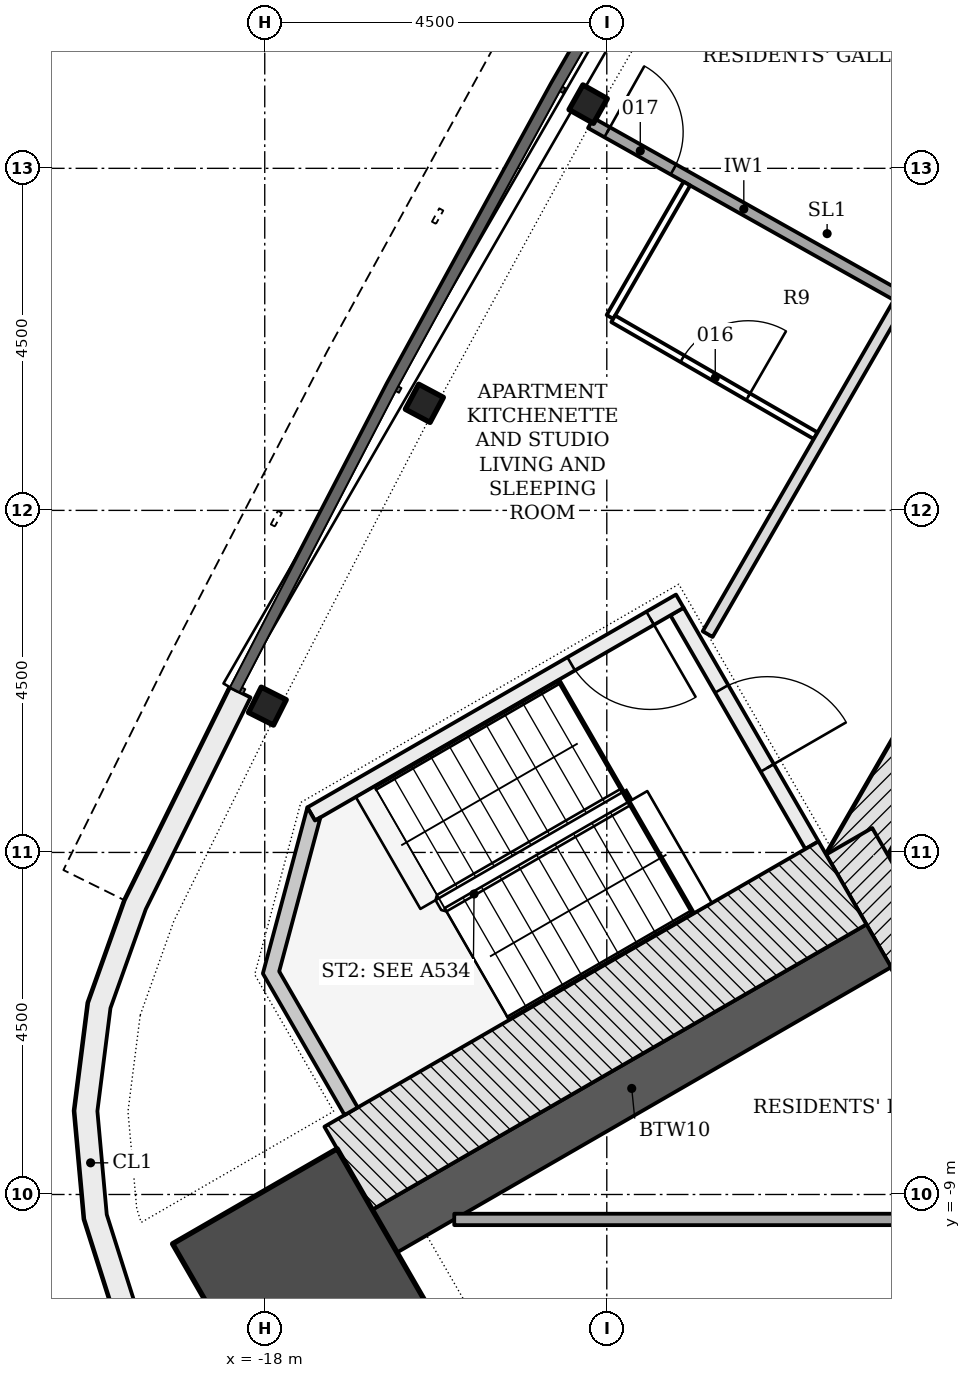
"""IFC4 building model, lengths in metres.
Left out: names, types, materials, properties, quantities, classifications, styles, units other than length and angle.
Written with IfcOpenShell. Run it as: python <this file> out.ifc"""

import sys

from ifc_helpers import new_model, si_unit, direction, frame, frame_2d, origin, origin_2d, place, context, subcontext, project, spatial, polyline, rectangle, i_section, outline, extrude, element, fill, save


model = new_model("IFC4")
c1 = context("Model", 3, precision=1e-05, world=origin(), true_north=direction((0.0, 1.0)))
c2 = subcontext(c1, "Body", "Model", "MODEL_VIEW")
j1 = project(units=[si_unit("LENGTHUNIT", "METRE"), si_unit("PLANEANGLEUNIT", "RADIAN")], contexts=[c1])
p1 = place(None, origin())
s1 = spatial("IfcSite", under=j1, at=p1, CompositionType="ELEMENT")
p2 = place(p1, origin())
s2 = spatial("IfcBuilding", under=s1, at=p2, CompositionType="ELEMENT")
p3 = place(p2, frame((0.0, 0.0, 232.8)))
s3 = spatial("IfcBuildingStorey", under=s2, at=p3, CompositionType="ELEMENT", Elevation=232.8)
p4 = place(p3, frame((-1.083, 11.281, -0.2), z_axis=(0.0, 0.0, 1.0), x_axis=(-0.500001446645, -0.866024568562, 0.0)))
e1 = element("IfcWall", 1, at=p4, inside=s3, PredefinedType="SHEAR", context=c2, shape_type="SweptSolid", body=[
    extrude(rectangle(XDim=18.458, YDim=0.7, at=frame_2d((9.229, 0.0))), origin(), (0.0, 0.0, 1.0), 3.6),
])
p5 = place(p4, frame((8.979, 0.0, 0.2)))
e2 = element("IfcOpeningElement", 2, at=p5, cuts=e1, PredefinedType="OPENING", context=c2, shape_type="SweptSolid", body=[
    extrude(rectangle(XDim=1.2, YDim=2.1, at=frame_2d((0.6, 1.05))), frame((0.0, 0.36, 0.0), z_axis=(0.0, -1.0, 0.0), x_axis=(1.0, 0.0, 0.0)), (0.0, 0.0, 1.0), 0.72),
])
p6 = place(p4, frame((11.029, 0.0, 0.2)))
e3 = element("IfcOpeningElement", 3, at=p6, cuts=e1, PredefinedType="OPENING", context=c2, shape_type="SweptSolid", body=[
    extrude(rectangle(XDim=1.2, YDim=2.1, at=frame_2d((0.6, 1.05))), frame((0.0, 0.36, 0.0), z_axis=(0.0, -1.0, 0.0), x_axis=(1.0, 0.0, 0.0)), (0.0, 0.0, 1.0), 0.72),
])
p7 = place(p3, frame((-10.311, -4.353, -0.2), z_axis=(0.0, 0.0, 1.0), x_axis=(0.500042739161, -0.866000726912, 0.0)))
e4 = element("IfcWall", 4, at=p7, inside=s3, PredefinedType="SHEAR", context=c2, shape_type="SweptSolid", body=[
    extrude(rectangle(XDim=2.771, YDim=0.7, at=frame_2d((1.386, 0.0))), origin(), (0.0, 0.0, 1.0), 3.6),
])
p8 = place(p3, frame((-9.922, -5.728, -0.2), z_axis=(0.0, 0.0, 1.0), x_axis=(-0.866026891245, -0.499997423634, 0.0)))
e5 = element("IfcWall", 5, at=p8, inside=s3, PredefinedType="SHEAR", context=c2, shape_type="SweptSolid", body=[
    extrude(rectangle(XDim=7.506, YDim=0.65, at=frame_2d((3.753, 0.0))), origin(), (0.0, 0.0, 1.0), 3.6),
])
p9 = place(p3, frame((-17.505, -10.106, -0.2), z_axis=(0.0, 0.0, 1.0), x_axis=(-0.866025403784, -0.5, 0.0)))
e6 = element("IfcColumn", 6, at=p9, inside=s3, PredefinedType="COLUMN", context=c2, shape_type="SweptSolid", body=[
    extrude(rectangle(XDim=2.5, YDim=2.5, at=origin_2d()), origin(), (0.0, 0.0, 1.0), 3.6),
])
for number, where, z_axis, x_axis in (
    (7, (-13.745, 5.345, -0.2), (0.0, 0.0, 1.0), (-0.49, -0.872, 0.0)),
    (8, (-15.9, 1.409, -0.2), (0.0, 0.0, 1.0), (-0.47, -0.883, 0.0)),
    (9, (-17.965, -2.575, -0.2), (0.0, 0.0, 1.0), (-0.45, -0.893, 0.0)),
):
    element("IfcColumn", number, at=place(p3, frame(where, z_axis=z_axis, x_axis=x_axis)), inside=s3, PredefinedType="COLUMN", context=c2, shape_type="SweptSolid", body=[
        extrude(i_section(OverallWidth=0.373, OverallDepth=0.368, WebThickness=0.015, FlangeThickness=0.024, FilletRadius=0.015, at=origin_2d()), origin(), (0.0, 0.0, 1.0), 3.6),
    ])
p10 = place(p3, origin())
e10 = element("IfcWall", 10, at=p10, inside=s3, PredefinedType="NOTDEFINED", context=c2, shape_type="SweptSolid", body=[
    extrude(outline(polyline([(-18.457, -2.328), (-19.842, -5.13), (-20.323, -6.478), (-20.504, -7.898), (-20.375, -9.323), (-19.942, -10.687), (-19.227, -11.927), (-18.261, -12.983), (-17.092, -13.808), (-15.772, -14.361), (-14.364, -14.619), (-11.244, -14.82), (-11.225, -14.521), (-14.327, -14.32), (-15.686, -14.072), (-16.945, -13.544), (-18.062, -12.757), (-18.983, -11.748), (-19.666, -10.566), (-20.079, -9.264), (-20.202, -7.903), (-20.03, -6.548), (-19.565, -5.248), (-18.188, -2.46), (-18.457, -2.328)])), origin(), (0.0, 0.0, 1.0), 3.3),
])
p11 = place(p3, frame((-12.576, -1.331, -0.2), z_axis=(0.0, 0.0, 1.0), x_axis=(0.499970499736, -0.8660424351, 0.0)))
e11 = element("IfcWall", 11, at=p11, inside=s3, PredefinedType="SHEAR", context=c2, shape_type="SweptSolid", body=[
    extrude(rectangle(XDim=3.55, YDim=0.2, at=frame_2d((1.775, 0.0))), origin(), (0.0, 0.0, 1.0), 3.6),
])
p12 = place(p11, frame((1.175, 0.0, 0.2)))
e12 = element("IfcOpeningElement", 12, at=p12, cuts=e11, PredefinedType="OPENING", context=c2, shape_type="SweptSolid", body=[
    extrude(rectangle(XDim=1.2, YDim=2.1, at=frame_2d((0.6, 1.05))), frame((0.0, 0.11, 0.0), z_axis=(0.0, -1.0, 0.0), x_axis=(1.0, 0.0, 0.0)), (0.0, 0.0, 1.0), 0.22),
])
p13 = place(p3, frame((-12.539, -1.194, -0.2), z_axis=(0.0, 0.0, 1.0), x_axis=(-0.866045472092, -0.499965239061, 0.0)))
e13 = element("IfcWall", 13, at=p13, inside=s3, PredefinedType="SHEAR", context=c2, shape_type="SweptSolid", body=[
    extrude(rectangle(XDim=5.6, YDim=0.2, at=frame_2d((2.8, 0.0))), origin(), (0.0, 0.0, 1.0), 3.6),
])
p14 = place(p13, frame((0.45, 0.0, 0.2)))
e14 = element("IfcOpeningElement", 14, at=p14, cuts=e13, PredefinedType="OPENING", context=c2, shape_type="SweptSolid", body=[
    extrude(rectangle(XDim=1.2, YDim=2.1, at=frame_2d((0.6, 1.05))), frame((0.0, 0.11, 0.0), z_axis=(0.0, -1.0, 0.0), x_axis=(1.0, 0.0, 0.0)), (0.0, 0.0, 1.0), 0.22),
])
p15 = place(p3, frame((-10.399, -4.901, -0.2), z_axis=(0.0, 0.0, 1.0), x_axis=(-0.866020939036, -0.500007733091, 0.0)))
e15 = element("IfcWall", 15, at=p15, inside=s3, PredefinedType="SHEAR", context=c2, shape_type="SweptSolid", body=[
    extrude(rectangle(XDim=7.507, YDim=1.261, at=frame_2d((3.753, 0.0))), origin(), (0.0, 0.0, 1.0), 3.6),
])
p16 = place(p3, frame((0.0, 0.0, -0.2)))
e16 = element("IfcWall", 16, at=p16, inside=s3, PredefinedType="SHEAR", context=c2, shape_type="SweptSolid", body=[
    extrude(outline(polyline([(-17.439, -3.907), (-18.025, -6.093), (-16.95, -7.955), (-16.777, -7.855), (-17.81, -6.065), (-17.267, -4.039), (-17.339, -4.081), (-17.339, -4.081), (-17.339, -4.081), (-17.339, -4.081), (-17.339, -4.081), (-17.339, -4.081), (-17.339, -4.081), (-17.339, -4.081), (-17.339, -4.081), (-17.339, -4.081), (-17.339, -4.081), (-17.339, -4.081), (-17.339, -4.081), (-17.339, -4.081), (-17.339, -4.081), (-17.339, -4.081), (-17.339, -4.081), (-17.439, -3.907)])), origin(), (0.0, 0.0, 1.0), 3.6),
])
p17 = place(p3, frame((-15.507, -9.328, 0.0), z_axis=(0.0, 0.0, 1.0), x_axis=(1.0, 0.0, 0.0)))
e17 = element("IfcWall", 17, at=p17, inside=s3, PredefinedType="PARTITIONING", context=c2, shape_type="SweptSolid", body=[
    extrude(rectangle(XDim=13.522, YDim=0.15, at=frame_2d((6.761, 0.0))), origin(), (0.0, 0.0, 1.0), 2.852),
])
p18 = place(p17, frame((6.236, 0.0, 0.0)))
e18 = element("IfcOpeningElement", 18, at=p18, cuts=e17, PredefinedType="OPENING", context=c2, shape_type="SweptSolid", body=[
    extrude(rectangle(XDim=1.0, YDim=2.1, at=frame_2d((0.5, 1.05))), frame((0.0, 0.085, 0.0), z_axis=(0.0, -1.0, 0.0), x_axis=(1.0, 0.0, 0.0)), (0.0, 0.0, 1.0), 0.17),
])
p19 = place(p3, frame((-9.619, 2.795, 0.0), z_axis=(0.0, 0.0, 1.0), x_axis=(-0.499963809755, -0.866046297224, 0.0)))
e19 = element("IfcWall", 19, at=p19, inside=s3, PredefinedType="PARTITIONING", context=c2, shape_type="SweptSolid", body=[
    extrude(rectangle(XDim=5.108, YDim=0.15, at=frame_2d((2.554, 0.0))), origin(), (0.0, 0.0, 1.0), 2.852),
])
p20 = place(p3, frame((-13.71, 5.096, 0.0), z_axis=(0.0, 0.0, 1.0), x_axis=(0.871644704197, -0.490138255644, 0.0)))
e20 = element("IfcWall", 20, at=p20, inside=s3, PredefinedType="PARTITIONING", context=c2, shape_type="SweptSolid", body=[
    extrude(rectangle(XDim=4.618, YDim=0.15, at=frame_2d((2.309, 0.0))), origin(), (0.0, 0.0, 1.0), 3.4),
])
p21 = place(p20, frame((0.247, 0.0, 0.0)))
e21 = element("IfcOpeningElement", 21, at=p21, cuts=e20, PredefinedType="OPENING", context=c2, shape_type="SweptSolid", body=[
    extrude(rectangle(XDim=1.0, YDim=2.1, at=frame_2d((0.5, 1.05))), frame((0.0, 0.085, 0.0), z_axis=(0.0, -1.0, 0.0), x_axis=(1.0, 0.0, 0.0)), (0.0, 0.0, 1.0), 0.17),
])
p22 = place(p3, frame((-12.446, 4.299, 0.0), z_axis=(0.0, 0.0, 1.0), x_axis=(-0.499938124251, -0.866061124818, 0.0)))
e22 = element("IfcWall", 22, at=p22, inside=s3, PredefinedType="PARTITIONING", context=c2, shape_type="SweptSolid", body=[
    extrude(rectangle(XDim=2.025, YDim=0.1, at=frame_2d((1.013, 0.0))), origin(), (0.0, 0.0, 1.0), 3.4),
])
p23 = place(p3, frame((-13.415, 2.52, 0.0), z_axis=(0.0, 0.0, 1.0), x_axis=(0.865996501658, -0.50005005661, 0.0)))
e23 = element("IfcWall", 23, at=p23, inside=s3, PredefinedType="PARTITIONING", context=c2, shape_type="SweptSolid", body=[
    extrude(rectangle(XDim=3.075, YDim=0.1, at=frame_2d((1.538, 0.0))), origin(), (0.0, 0.0, 1.0), 3.4),
])
p24 = place(p23, frame((1.05, 0.0, 0.0)))
e24 = element("IfcOpeningElement", 24, at=p24, cuts=e23, PredefinedType="OPENING", context=c2, shape_type="SweptSolid", body=[
    extrude(rectangle(XDim=1.0, YDim=2.1, at=frame_2d((0.5, 1.05))), frame((0.0, 0.06, 0.0), z_axis=(0.0, -1.0, 0.0), x_axis=(1.0, 0.0, 0.0)), (0.0, 0.0, 1.0), 0.12),
])
p25 = place(p12, origin())
e25 = element("IfcDoor", 25, at=p25, inside=s3, OperationType="SINGLE_SWING_RIGHT", PredefinedType="DOOR", context=c2, shape_type="SweptSolid", body=[
    extrude(rectangle(XDim=1.2, YDim=2.1, at=frame_2d((0.6, 1.05))), frame((0.0, 0.025, 0.0), z_axis=(0.0, -1.0, 0.0), x_axis=(1.0, 0.0, 0.0)), (0.0, 0.0, 1.0), 0.05),
])
fill(e12, e25)
p26 = place(p14, origin())
e26 = element("IfcDoor", 26, at=p26, inside=s3, OperationType="SINGLE_SWING_LEFT", PredefinedType="DOOR", context=c2, shape_type="SweptSolid", body=[
    extrude(rectangle(XDim=1.2, YDim=2.1, at=frame_2d((0.6, 1.05))), frame((0.0, 0.025, 0.0), z_axis=(0.0, -1.0, 0.0), x_axis=(1.0, 0.0, 0.0)), (0.0, 0.0, 1.0), 0.05),
])
fill(e14, e26)
p27 = place(p24, origin())
e27 = element("IfcDoor", 27, at=p27, inside=s3, OperationType="SINGLE_SWING_RIGHT", PredefinedType="DOOR", context=c2, shape_type="SweptSolid", body=[
    extrude(rectangle(XDim=1.0, YDim=2.1, at=frame_2d((0.5, 1.05))), frame((0.0, 0.025, 0.0), z_axis=(0.0, -1.0, 0.0), x_axis=(1.0, 0.0, 0.0)), (0.0, 0.0, 1.0), 0.05),
])
fill(e24, e27)
p28 = place(p21, origin())
e28 = element("IfcDoor", 28, at=p28, inside=s3, OperationType="SINGLE_SWING_LEFT", PredefinedType="DOOR", context=c2, shape_type="SweptSolid", body=[
    extrude(rectangle(XDim=1.0, YDim=2.1, at=frame_2d((0.5, 1.05))), frame((0.0, 0.025, 0.0), z_axis=(0.0, -1.0, 0.0), x_axis=(1.0, 0.0, 0.0)), (0.0, 0.0, 1.0), 0.05),
])
fill(e21, e28)
save(model, sys.argv[1])
